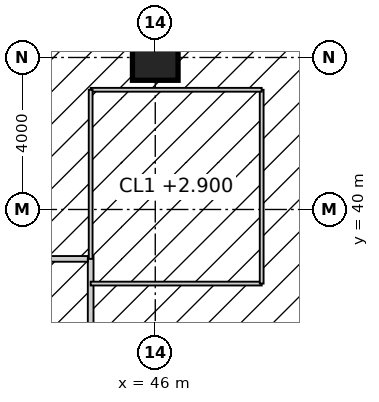
"""IFC4 building model, lengths in metres.
Left out: names, types, materials, properties, quantities, classifications, styles, units other than length and angle.
Written with IfcOpenShell. Run it as: python <this file> out.ifc"""

import sys

from ifc_helpers import new_model, si_unit, direction, frame, frame_2d, origin, origin_2d, place, context, subcontext, project, spatial, rectangle, hollow_rectangle, extrude, element, fill, save


model = new_model("IFC4")
c1 = context("Model", 3, precision=1e-05, world=origin(), true_north=direction((0.0, 1.0)))
c2 = subcontext(c1, "Body", "Model", "MODEL_VIEW")
j1 = project(units=[si_unit("LENGTHUNIT", "METRE"), si_unit("PLANEANGLEUNIT", "RADIAN")], contexts=[c1])
p1 = place(None, origin())
s1 = spatial("IfcSite", under=j1, at=p1, CompositionType="ELEMENT")
p2 = place(p1, origin())
s2 = spatial("IfcBuilding", under=s1, at=p2, CompositionType="ELEMENT")
p3 = place(p2, frame((0.0, 0.0, 51.0)))
s3 = spatial("IfcBuildingStorey", under=s2, at=p3, CompositionType="ELEMENT", Elevation=51.0)
p4 = place(p3, frame((46.0, 44.0, 0.0), z_axis=(0.0, 0.0, 1.0), x_axis=(1.0, 0.0, 0.0)))
e1 = element("IfcColumn", 1, at=p4, inside=s3, PredefinedType="COLUMN", context=c2, shape_type="SweptSolid", body=[
    extrude(hollow_rectangle(XDim=1.2, YDim=1.2, WallThickness=0.1, at=origin_2d()), origin(), (0.0, 0.0, 1.0), 4.0),
])
p5 = place(p3, frame((44.3, 15.225, 0.0), z_axis=(0.0, 0.0, 1.0), x_axis=(0.0, 1.0, 0.0)))
e2 = element("IfcWall", 2, at=p5, inside=s3, PredefinedType="PARTITIONING", context=c2, shape_type="SweptSolid", body=[
    extrude(rectangle(XDim=23.55, YDim=0.15, at=frame_2d((11.775, 0.0))), origin(), (0.0, 0.0, 1.0), 3.85),
])
p6 = place(p5, frame((7.175, 0.0, 0.0)))
e3 = element("IfcOpeningElement", 3, at=p6, cuts=e2, PredefinedType="OPENING", context=c2, shape_type="SweptSolid", body=[
    extrude(rectangle(XDim=1.8, YDim=2.4, at=frame_2d((0.9, 1.2))), frame((0.0, 0.085, 0.0), z_axis=(0.0, -1.0, 0.0), x_axis=(1.0, 0.0, 0.0)), (0.0, 0.0, 1.0), 0.17),
])
p7 = place(p5, frame((18.175, 0.0, 0.0)))
e4 = element("IfcOpeningElement", 4, at=p7, cuts=e2, PredefinedType="OPENING", context=c2, shape_type="SweptSolid", body=[
    extrude(rectangle(XDim=1.8, YDim=2.4, at=frame_2d((0.9, 1.2))), frame((0.0, 0.085, 0.0), z_axis=(0.0, -1.0, 0.0), x_axis=(1.0, 0.0, 0.0)), (0.0, 0.0, 1.0), 0.17),
])
p8 = place(p3, frame((15.175, 38.7, 0.0), z_axis=(0.0, 0.0, 1.0), x_axis=(1.0, 0.0, 0.0)))
e5 = element("IfcWall", 5, at=p8, inside=s3, PredefinedType="PARTITIONING", context=c2, shape_type="SweptSolid", body=[
    extrude(rectangle(XDim=29.05, YDim=0.15, at=frame_2d((14.525, 0.0))), origin(), (0.0, 0.0, 1.0), 3.85),
])
p9 = place(p8, frame((8.575, 0.0, 0.0)))
e6 = element("IfcOpeningElement", 6, at=p9, cuts=e5, PredefinedType="OPENING", context=c2, shape_type="SweptSolid", body=[
    extrude(rectangle(XDim=0.9, YDim=2.1, at=frame_2d((0.45, 1.05))), frame((0.0, 0.085, 0.0), z_axis=(0.0, -1.0, 0.0), x_axis=(1.0, 0.0, 0.0)), (0.0, 0.0, 1.0), 0.17),
])
p10 = place(p8, frame((12.325, 0.0, 0.0)))
e7 = element("IfcOpeningElement", 7, at=p10, cuts=e5, PredefinedType="OPENING", context=c2, shape_type="SweptSolid", body=[
    extrude(rectangle(XDim=1.0, YDim=2.1, at=frame_2d((0.5, 1.05))), frame((0.0, 0.085, 0.0), z_axis=(0.0, -1.0, 0.0), x_axis=(1.0, 0.0, 0.0)), (0.0, 0.0, 1.0), 0.17),
])
p11 = place(p8, frame((16.175, 0.0, 0.0)))
e8 = element("IfcOpeningElement", 8, at=p11, cuts=e5, PredefinedType="OPENING", context=c2, shape_type="SweptSolid", body=[
    extrude(rectangle(XDim=0.9, YDim=2.1, at=frame_2d((0.45, 1.05))), frame((0.0, 0.085, 0.0), z_axis=(0.0, -1.0, 0.0), x_axis=(1.0, 0.0, 0.0)), (0.0, 0.0, 1.0), 0.17),
])
p12 = place(p3, frame((44.3, 38.05, 0.0), z_axis=(0.0, 0.0, 1.0), x_axis=(1.0, 0.0, 0.0)))
e9 = element("IfcWall", 9, at=p12, inside=s3, PredefinedType="PARTITIONING", context=c2, shape_type="SweptSolid", body=[
    extrude(rectangle(XDim=4.5, YDim=0.1, at=frame_2d((2.25, 0.0))), origin(), (0.0, 0.0, 1.0), 3.85),
])
p13 = place(p3, frame((48.8, 38.05, 0.0), z_axis=(0.0, 0.0, 1.0), x_axis=(0.0, 1.0, 0.0)))
e10 = element("IfcWall", 10, at=p13, inside=s3, PredefinedType="PARTITIONING", context=c2, shape_type="SweptSolid", body=[
    extrude(rectangle(XDim=5.1, YDim=0.1, at=frame_2d((2.55, 0.0))), origin(), (0.0, 0.0, 1.0), 3.85),
])
p14 = place(p13, frame((2.05, 0.0, 0.0)))
e11 = element("IfcOpeningElement", 11, at=p14, cuts=e10, PredefinedType="OPENING", context=c2, shape_type="SweptSolid", body=[
    extrude(rectangle(XDim=1.0, YDim=2.2, at=frame_2d((0.5, 1.1))), frame((0.0, 0.06, 0.0), z_axis=(0.0, -1.0, 0.0), x_axis=(1.0, 0.0, 0.0)), (0.0, 0.0, 1.0), 0.12),
])
p15 = place(p3, frame((48.8, 43.15, 0.0), z_axis=(0.0, 0.0, 1.0), x_axis=(-1.0, 0.0, 0.0)))
e12 = element("IfcWall", 12, at=p15, inside=s3, PredefinedType="PARTITIONING", context=c2, shape_type="SweptSolid", body=[
    extrude(rectangle(XDim=4.5, YDim=0.1, at=frame_2d((2.25, 0.0))), origin(), (0.0, 0.0, 1.0), 3.85),
])
p16 = place(p3, frame((44.3, 43.15, 0.0), z_axis=(0.0, 0.0, 1.0), x_axis=(0.0, -1.0, 0.0)))
e13 = element("IfcWall", 13, at=p16, inside=s3, PredefinedType="PARTITIONING", context=c2, shape_type="SweptSolid", body=[
    extrude(rectangle(XDim=4.45, YDim=0.1, at=frame_2d((2.225, 0.0))), origin(), (0.0, 0.0, 1.0), 3.85),
])
p17 = place(p14, origin())
e14 = element("IfcDoor", 14, at=p17, inside=s3, OperationType="SINGLE_SWING_RIGHT", PredefinedType="DOOR", context=c2, shape_type="SweptSolid", body=[
    extrude(rectangle(XDim=1.0, YDim=2.2, at=frame_2d((0.5, 1.1))), frame((0.0, 0.025, 0.0), z_axis=(0.0, -1.0, 0.0), x_axis=(1.0, 0.0, 0.0)), (0.0, 0.0, 1.0), 0.05),
])
fill(e11, e14)
save(model, sys.argv[1])
